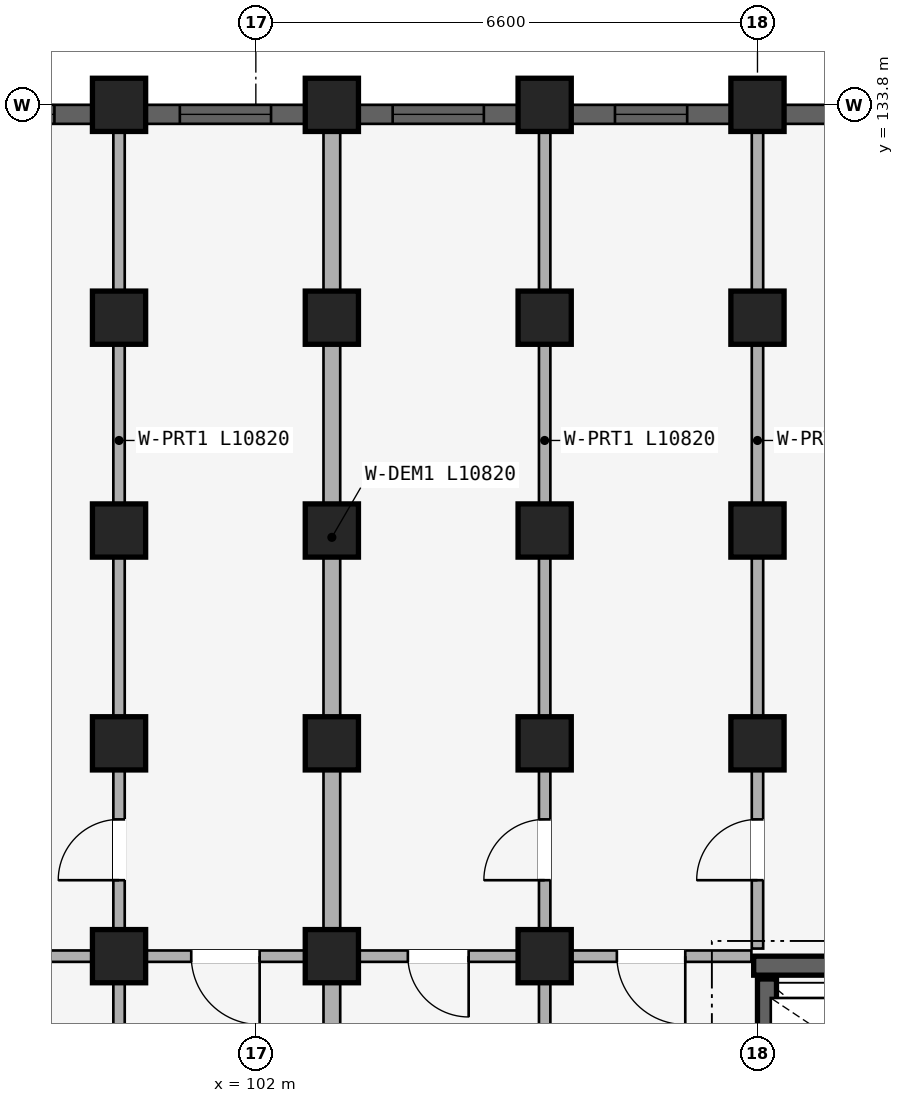
"""IFC4 building model, lengths in metres.
Left out: names, types, materials, properties, quantities, classifications, styles, units other than length and angle.
Written with IfcOpenShell. Run it as: python <this file> out.ifc"""

import sys

from ifc_helpers import new_model, si_unit, direction, frame, frame_2d, origin, origin_2d, place, context, subcontext, project, spatial, rectangle, extrude, element, fill, save


model = new_model("IFC4")
c1 = context("Model", 3, precision=1e-05, world=origin(), true_north=direction((0.0, 1.0)))
c2 = subcontext(c1, "Body", "Model", "MODEL_VIEW")
j1 = project(units=[si_unit("LENGTHUNIT", "METRE"), si_unit("PLANEANGLEUNIT", "RADIAN")], contexts=[c1])
p1 = place(None, origin())
s1 = spatial("IfcSite", under=j1, at=p1, CompositionType="ELEMENT")
p2 = place(p1, origin())
s2 = spatial("IfcBuilding", under=s1, at=p2, CompositionType="ELEMENT")
p3 = place(p2, frame((0.0, 0.0, 27.6)))
s3 = spatial("IfcBuildingStorey", under=s2, at=p3, CompositionType="ELEMENT", Elevation=27.6)
p4 = place(p3, frame((111.35, 122.475, 0.0), z_axis=(0.0, 0.0, 1.0), x_axis=(-1.0, 0.0, 0.0)))
e1 = element("IfcWall", 1, at=p4, inside=s3, PredefinedType="SHEAR", context=c2, shape_type="SweptSolid", body=[
    extrude(rectangle(XDim=2.8, YDim=0.25, at=frame_2d((1.4, 0.0))), origin(), (0.0, 0.0, 1.0), 2.93),
])
p5 = place(p3, frame((108.725, 120.15, 0.0), z_axis=(0.0, 0.0, 1.0), x_axis=(0.0, 1.0, 0.0)))
e2 = element("IfcWall", 2, at=p5, inside=s3, PredefinedType="SHEAR", context=c2, shape_type="SweptSolid", body=[
    extrude(rectangle(XDim=2.15, YDim=0.25, at=frame_2d((1.075, 0.0))), origin(), (0.0, 0.0, 1.0), 2.93),
])
for number, where, z_axis, x_axis in (
    (3, (108.6, 125.4, 0.0), (0.0, 0.0, 1.0), (1.0, 0.0, 0.0)),
    (4, (108.6, 128.2, 0.0), (0.0, 0.0, 1.0), (1.0, 0.0, 0.0)),
    (5, (108.6, 131.0, 0.0), (0.0, 0.0, 1.0), (1.0, 0.0, 0.0)),
):
    element("IfcColumn", number, at=place(p3, frame(where, z_axis=z_axis, x_axis=x_axis)), inside=s3, PredefinedType="COLUMN", context=c2, shape_type="SweptSolid", body=[
        extrude(rectangle(XDim=0.7, YDim=0.7, at=origin_2d()), origin(), (0.0, 0.0, 1.0), 2.93),
    ])
p6 = place(p3, frame((108.6, 133.8, 0.0), z_axis=(0.0, 0.0, 1.0), x_axis=(1.0, 0.0, 0.0)))
e6 = element("IfcColumn", 6, at=p6, inside=s3, PredefinedType="COLUMN", context=c2, shape_type="SweptSolid", body=[
    extrude(rectangle(XDim=0.7, YDim=0.7, at=origin_2d()), origin(), (0.0, 0.0, 1.0), 2.97),
])
for number, where, z_axis, x_axis in (
    (7, (105.8, 122.6, 0.0), (0.0, 0.0, 1.0), (1.0, 0.0, 0.0)),
    (8, (105.8, 125.4, 0.0), (0.0, 0.0, 1.0), (1.0, 0.0, 0.0)),
    (9, (105.8, 128.2, 0.0), (0.0, 0.0, 1.0), (1.0, 0.0, 0.0)),
    (10, (105.8, 131.0, 0.0), (0.0, 0.0, 1.0), (1.0, 0.0, 0.0)),
):
    element("IfcColumn", number, at=place(p3, frame(where, z_axis=z_axis, x_axis=x_axis)), inside=s3, PredefinedType="COLUMN", context=c2, shape_type="SweptSolid", body=[
        extrude(rectangle(XDim=0.7, YDim=0.7, at=origin_2d()), origin(), (0.0, 0.0, 1.0), 2.93),
    ])
p7 = place(p3, frame((105.8, 133.8, 0.0), z_axis=(0.0, 0.0, 1.0), x_axis=(1.0, 0.0, 0.0)))
e11 = element("IfcColumn", 11, at=p7, inside=s3, PredefinedType="COLUMN", context=c2, shape_type="SweptSolid", body=[
    extrude(rectangle(XDim=0.7, YDim=0.7, at=origin_2d()), origin(), (0.0, 0.0, 1.0), 2.97),
])
for number, where, z_axis, x_axis in (
    (12, (103.0, 122.6, 0.0), (0.0, 0.0, 1.0), (1.0, 0.0, 0.0)),
    (13, (103.0, 125.4, 0.0), (0.0, 0.0, 1.0), (1.0, 0.0, 0.0)),
    (14, (103.0, 128.2, 0.0), (0.0, 0.0, 1.0), (1.0, 0.0, 0.0)),
    (15, (103.0, 131.0, 0.0), (0.0, 0.0, 1.0), (1.0, 0.0, 0.0)),
):
    element("IfcColumn", number, at=place(p3, frame(where, z_axis=z_axis, x_axis=x_axis)), inside=s3, PredefinedType="COLUMN", context=c2, shape_type="SweptSolid", body=[
        extrude(rectangle(XDim=0.7, YDim=0.7, at=origin_2d()), origin(), (0.0, 0.0, 1.0), 2.93),
    ])
p8 = place(p3, frame((103.0, 133.8, 0.0), z_axis=(0.0, 0.0, 1.0), x_axis=(1.0, 0.0, 0.0)))
e16 = element("IfcColumn", 16, at=p8, inside=s3, PredefinedType="COLUMN", context=c2, shape_type="SweptSolid", body=[
    extrude(rectangle(XDim=0.7, YDim=0.7, at=origin_2d()), origin(), (0.0, 0.0, 1.0), 2.97),
])
for number, where, z_axis, x_axis in (
    (17, (100.2, 122.6, 0.0), (0.0, 0.0, 1.0), (1.0, 0.0, 0.0)),
    (18, (100.2, 125.4, 0.0), (0.0, 0.0, 1.0), (1.0, 0.0, 0.0)),
    (19, (100.2, 128.2, 0.0), (0.0, 0.0, 1.0), (1.0, 0.0, 0.0)),
    (20, (100.2, 131.0, 0.0), (0.0, 0.0, 1.0), (1.0, 0.0, 0.0)),
):
    element("IfcColumn", number, at=place(p3, frame(where, z_axis=z_axis, x_axis=x_axis)), inside=s3, PredefinedType="COLUMN", context=c2, shape_type="SweptSolid", body=[
        extrude(rectangle(XDim=0.7, YDim=0.7, at=origin_2d()), origin(), (0.0, 0.0, 1.0), 2.93),
    ])
p9 = place(p3, frame((100.2, 133.8, 0.0), z_axis=(0.0, 0.0, 1.0), x_axis=(1.0, 0.0, 0.0)))
e21 = element("IfcColumn", 21, at=p9, inside=s3, PredefinedType="COLUMN", context=c2, shape_type="SweptSolid", body=[
    extrude(rectangle(XDim=0.7, YDim=0.7, at=origin_2d()), origin(), (0.0, 0.0, 1.0), 2.97),
])
p10 = place(p3, frame((108.52, 122.6, 0.0), z_axis=(0.0, 0.0, 1.0), x_axis=(-1.0, 0.0, 0.0)))
e22 = element("IfcWall", 22, at=p10, inside=s3, PredefinedType="PLUMBINGWALL", context=c2, shape_type="SweptSolid", body=[
    extrude(rectangle(XDim=2.64, YDim=0.15, at=frame_2d((1.32, 0.0))), origin(), (0.0, 0.0, 1.0), 2.372),
])
p11 = place(p10, frame((0.87, 0.0, 0.0)))
e23 = element("IfcOpeningElement", 23, at=p11, cuts=e22, PredefinedType="OPENING", context=c2, shape_type="SweptSolid", body=[
    extrude(rectangle(XDim=0.9, YDim=2.1, at=frame_2d((0.45, 1.05))), frame((0.0, 0.085, 0.0), z_axis=(0.0, -1.0, 0.0), x_axis=(1.0, 0.0, 0.0)), (0.0, 0.0, 1.0), 0.17),
])
p12 = place(p3, frame((105.72, 122.6, 0.0), z_axis=(0.0, 0.0, 1.0), x_axis=(-1.0, 0.0, 0.0)))
e24 = element("IfcWall", 24, at=p12, inside=s3, PredefinedType="PLUMBINGWALL", context=c2, shape_type="SweptSolid", body=[
    extrude(rectangle(XDim=2.64, YDim=0.15, at=frame_2d((1.32, 0.0))), origin(), (0.0, 0.0, 1.0), 2.372),
])
p13 = place(p12, frame((0.92, 0.0, 0.0)))
e25 = element("IfcOpeningElement", 25, at=p13, cuts=e24, PredefinedType="OPENING", context=c2, shape_type="SweptSolid", body=[
    extrude(rectangle(XDim=0.8, YDim=2.1, at=frame_2d((0.4, 1.05))), frame((0.0, 0.085, 0.0), z_axis=(0.0, -1.0, 0.0), x_axis=(1.0, 0.0, 0.0)), (0.0, 0.0, 1.0), 0.17),
])
p14 = place(p3, frame((102.92, 122.6, 0.0), z_axis=(0.0, 0.0, 1.0), x_axis=(-1.0, 0.0, 0.0)))
e26 = element("IfcWall", 26, at=p14, inside=s3, PredefinedType="PLUMBINGWALL", context=c2, shape_type="SweptSolid", body=[
    extrude(rectangle(XDim=2.64, YDim=0.15, at=frame_2d((1.32, 0.0))), origin(), (0.0, 0.0, 1.0), 2.372),
])
p15 = place(p14, frame((0.87, 0.0, 0.0)))
e27 = element("IfcOpeningElement", 27, at=p15, cuts=e26, PredefinedType="OPENING", context=c2, shape_type="SweptSolid", body=[
    extrude(rectangle(XDim=0.9, YDim=2.1, at=frame_2d((0.45, 1.05))), frame((0.0, 0.085, 0.0), z_axis=(0.0, -1.0, 0.0), x_axis=(1.0, 0.0, 0.0)), (0.0, 0.0, 1.0), 0.17),
])
p16 = place(p3, frame((100.12, 122.6, 0.0), z_axis=(0.0, 0.0, 1.0), x_axis=(-1.0, 0.0, 0.0)))
e28 = element("IfcWall", 28, at=p16, inside=s3, PredefinedType="PLUMBINGWALL", context=c2, shape_type="SweptSolid", body=[
    extrude(rectangle(XDim=2.64, YDim=0.15, at=frame_2d((1.32, 0.0))), origin(), (0.0, 0.0, 1.0), 2.372),
])
p17 = place(p16, frame((0.92, 0.0, 0.0)))
e29 = element("IfcOpeningElement", 29, at=p17, cuts=e28, PredefinedType="OPENING", context=c2, shape_type="SweptSolid", body=[
    extrude(rectangle(XDim=0.8, YDim=2.1, at=frame_2d((0.4, 1.05))), frame((0.0, 0.085, 0.0), z_axis=(0.0, -1.0, 0.0), x_axis=(1.0, 0.0, 0.0)), (0.0, 0.0, 1.0), 0.17),
])
p18 = place(p3, frame((108.6, 122.7, 0.0), z_axis=(0.0, 0.0, 1.0), x_axis=(0.0, 1.0, 0.0)))
e30 = element("IfcWall", 30, at=p18, inside=s3, PredefinedType="PARTITIONING", context=c2, shape_type="SweptSolid", body=[
    extrude(rectangle(XDim=10.82, YDim=0.15, at=frame_2d((5.41, 0.0))), origin(), (0.0, 0.0, 1.0), 2.372),
])
p19 = place(p18, frame((0.899, 0.0, 0.0)))
e31 = element("IfcOpeningElement", 31, at=p19, cuts=e30, PredefinedType="OPENING", context=c2, shape_type="SweptSolid", body=[
    extrude(rectangle(XDim=0.8, YDim=2.1, at=frame_2d((0.4, 1.05))), frame((0.0, 0.085, 0.0), z_axis=(0.0, -1.0, 0.0), x_axis=(1.0, 0.0, 0.0)), (0.0, 0.0, 1.0), 0.17),
])
p20 = place(p3, frame((105.8, 116.05, 0.0), z_axis=(0.0, 0.0, 1.0), x_axis=(0.0, 1.0, 0.0)))
e32 = element("IfcWall", 32, at=p20, inside=s3, PredefinedType="PARTITIONING", context=c2, shape_type="SweptSolid", body=[
    extrude(rectangle(XDim=6.53, YDim=0.15, at=frame_2d((3.265, 0.0))), origin(), (0.0, 0.0, 1.0), 2.372),
])
p21 = place(p20, frame((2.815, 0.0, 0.0)))
e33 = element("IfcOpeningElement", 33, at=p21, cuts=e32, PredefinedType="OPENING", context=c2, shape_type="SweptSolid", body=[
    extrude(rectangle(XDim=0.9, YDim=2.1, at=frame_2d((0.45, 1.05))), frame((0.0, 0.085, 0.0), z_axis=(0.0, -1.0, 0.0), x_axis=(1.0, 0.0, 0.0)), (0.0, 0.0, 1.0), 0.17),
])
p22 = place(p3, frame((105.8, 122.7, 0.0), z_axis=(0.0, 0.0, 1.0), x_axis=(0.0, 1.0, 0.0)))
e34 = element("IfcWall", 34, at=p22, inside=s3, PredefinedType="PARTITIONING", context=c2, shape_type="SweptSolid", body=[
    extrude(rectangle(XDim=10.82, YDim=0.15, at=frame_2d((5.41, 0.0))), origin(), (0.0, 0.0, 1.0), 2.372),
])
p23 = place(p22, frame((0.899, 0.0, 0.0)))
e35 = element("IfcOpeningElement", 35, at=p23, cuts=e34, PredefinedType="OPENING", context=c2, shape_type="SweptSolid", body=[
    extrude(rectangle(XDim=0.8, YDim=2.1, at=frame_2d((0.4, 1.05))), frame((0.0, 0.085, 0.0), z_axis=(0.0, -1.0, 0.0), x_axis=(1.0, 0.0, 0.0)), (0.0, 0.0, 1.0), 0.17),
])
p24 = place(p3, frame((103.0, 116.05, 0.0), z_axis=(0.0, 0.0, 1.0), x_axis=(0.0, 1.0, 0.0)))
e36 = element("IfcWall", 36, at=p24, inside=s3, PredefinedType="STANDARD", context=c2, shape_type="SweptSolid", body=[
    extrude(rectangle(XDim=6.53, YDim=0.22, at=frame_2d((3.265, 0.0))), origin(), (0.0, 0.0, 1.0), 2.372),
])
p25 = place(p3, frame((103.0, 122.7, 0.0), z_axis=(0.0, 0.0, 1.0), x_axis=(0.0, 1.0, 0.0)))
e37 = element("IfcWall", 37, at=p25, inside=s3, PredefinedType="STANDARD", context=c2, shape_type="SweptSolid", body=[
    extrude(rectangle(XDim=10.82, YDim=0.22, at=frame_2d((5.41, 0.0))), origin(), (0.0, 0.0, 1.0), 2.372),
])
p26 = place(p3, frame((100.2, 116.05, 0.0), z_axis=(0.0, 0.0, 1.0), x_axis=(0.0, 1.0, 0.0)))
e38 = element("IfcWall", 38, at=p26, inside=s3, PredefinedType="PARTITIONING", context=c2, shape_type="SweptSolid", body=[
    extrude(rectangle(XDim=6.53, YDim=0.15, at=frame_2d((3.265, 0.0))), origin(), (0.0, 0.0, 1.0), 2.372),
])
p27 = place(p26, frame((2.815, 0.0, 0.0)))
e39 = element("IfcOpeningElement", 39, at=p27, cuts=e38, PredefinedType="OPENING", context=c2, shape_type="SweptSolid", body=[
    extrude(rectangle(XDim=0.9, YDim=2.1, at=frame_2d((0.45, 1.05))), frame((0.0, 0.085, 0.0), z_axis=(0.0, -1.0, 0.0), x_axis=(1.0, 0.0, 0.0)), (0.0, 0.0, 1.0), 0.17),
])
p28 = place(p3, frame((100.2, 122.7, 0.0), z_axis=(0.0, 0.0, 1.0), x_axis=(0.0, 1.0, 0.0)))
e40 = element("IfcWall", 40, at=p28, inside=s3, PredefinedType="PARTITIONING", context=c2, shape_type="SweptSolid", body=[
    extrude(rectangle(XDim=10.82, YDim=0.15, at=frame_2d((5.41, 0.0))), origin(), (0.0, 0.0, 1.0), 2.372),
])
p29 = place(p28, frame((0.899, 0.0, 0.0)))
e41 = element("IfcOpeningElement", 41, at=p29, cuts=e40, PredefinedType="OPENING", context=c2, shape_type="SweptSolid", body=[
    extrude(rectangle(XDim=0.8, YDim=2.1, at=frame_2d((0.4, 1.05))), frame((0.0, 0.085, 0.0), z_axis=(0.0, -1.0, 0.0), x_axis=(1.0, 0.0, 0.0)), (0.0, 0.0, 1.0), 0.17),
])
p30 = place(p3, frame((113.846, 133.675, 0.0), z_axis=(0.0, 0.0, 1.0), x_axis=(-1.0, 0.0, 0.0)))
e42 = element("IfcWall", 42, at=p30, inside=s3, PredefinedType="STANDARD", context=c2, shape_type="SweptSolid", body=[
    extrude(rectangle(XDim=4.893, YDim=0.25, at=frame_2d((2.446, 0.0))), origin(), (0.0, 0.0, 1.0), 2.48),
])
p31 = place(p30, frame((1.896, 0.0, 0.83)))
e43 = element("IfcOpeningElement", 43, at=p31, cuts=e42, PredefinedType="OPENING", context=c2, shape_type="SweptSolid", body=[
    extrude(rectangle(XDim=1.1, YDim=1.45, at=frame_2d((0.55, 0.725))), frame((0.0, 0.135, 0.0), z_axis=(0.0, -1.0, 0.0), x_axis=(1.0, 0.0, 0.0)), (0.0, 0.0, 1.0), 0.27),
])
p32 = place(p3, frame((108.247, 133.675, 0.0), z_axis=(0.0, 0.0, 1.0), x_axis=(-1.0, 0.0, 0.0)))
e44 = element("IfcWall", 44, at=p32, inside=s3, PredefinedType="STANDARD", context=c2, shape_type="SweptSolid", body=[
    extrude(rectangle(XDim=2.093, YDim=0.25, at=frame_2d((1.046, 0.0))), origin(), (0.0, 0.0, 1.0), 2.48),
])
p33 = place(p32, frame((0.572, 0.0, 0.88)))
e45 = element("IfcOpeningElement", 45, at=p33, cuts=e44, PredefinedType="OPENING", context=c2, shape_type="SweptSolid", body=[
    extrude(rectangle(XDim=0.95, YDim=1.35, at=frame_2d((0.475, 0.675))), frame((0.0, 0.135, 0.0), z_axis=(0.0, -1.0, 0.0), x_axis=(1.0, 0.0, 0.0)), (0.0, 0.0, 1.0), 0.27),
])
p34 = place(p3, frame((105.447, 133.675, 0.0), z_axis=(0.0, 0.0, 1.0), x_axis=(-1.0, 0.0, 0.0)))
e46 = element("IfcWall", 46, at=p34, inside=s3, PredefinedType="STANDARD", context=c2, shape_type="SweptSolid", body=[
    extrude(rectangle(XDim=2.093, YDim=0.25, at=frame_2d((1.046, 0.0))), origin(), (0.0, 0.0, 1.0), 2.48),
])
p35 = place(p34, frame((0.447, 0.0, 0.78)))
e47 = element("IfcOpeningElement", 47, at=p35, cuts=e46, PredefinedType="OPENING", context=c2, shape_type="SweptSolid", body=[
    extrude(rectangle(XDim=1.2, YDim=1.5, at=frame_2d((0.6, 0.75))), frame((0.0, 0.135, 0.0), z_axis=(0.0, -1.0, 0.0), x_axis=(1.0, 0.0, 0.0)), (0.0, 0.0, 1.0), 0.27),
])
p36 = place(p3, frame((102.646, 133.675, 0.0), z_axis=(0.0, 0.0, 1.0), x_axis=(-1.0, 0.0, 0.0)))
e48 = element("IfcWall", 48, at=p36, inside=s3, PredefinedType="STANDARD", context=c2, shape_type="SweptSolid", body=[
    extrude(rectangle(XDim=2.093, YDim=0.25, at=frame_2d((1.046, 0.0))), origin(), (0.0, 0.0, 1.0), 2.48),
])
p37 = place(p36, frame((0.447, 0.0, 0.78)))
e49 = element("IfcOpeningElement", 49, at=p37, cuts=e48, PredefinedType="OPENING", context=c2, shape_type="SweptSolid", body=[
    extrude(rectangle(XDim=1.2, YDim=1.5, at=frame_2d((0.6, 0.75))), frame((0.0, 0.135, 0.0), z_axis=(0.0, -1.0, 0.0), x_axis=(1.0, 0.0, 0.0)), (0.0, 0.0, 1.0), 0.27),
])
p38 = place(p3, frame((99.846, 133.675, 0.0), z_axis=(0.0, 0.0, 1.0), x_axis=(-1.0, 0.0, 0.0)))
e50 = element("IfcWall", 50, at=p38, inside=s3, PredefinedType="STANDARD", context=c2, shape_type="SweptSolid", body=[
    extrude(rectangle(XDim=2.093, YDim=0.25, at=frame_2d((1.046, 0.0))), origin(), (0.0, 0.0, 1.0), 2.48),
])
p39 = place(p38, frame((0.497, 0.0, 0.83)))
e51 = element("IfcOpeningElement", 51, at=p39, cuts=e50, PredefinedType="OPENING", context=c2, shape_type="SweptSolid", body=[
    extrude(rectangle(XDim=1.1, YDim=1.45, at=frame_2d((0.55, 0.725))), frame((0.0, 0.135, 0.0), z_axis=(0.0, -1.0, 0.0), x_axis=(1.0, 0.0, 0.0)), (0.0, 0.0, 1.0), 0.27),
])
p40 = place(p33, origin())
e52 = element("IfcWindow", 52, at=p40, inside=s3, PartitioningType="SINGLE_PANEL", PredefinedType="WINDOW", context=c2, shape_type="SweptSolid", body=[
    extrude(rectangle(XDim=0.95, YDim=1.35, at=frame_2d((0.475, 0.675))), frame((0.0, 0.03, 0.0), z_axis=(0.0, -1.0, 0.0), x_axis=(1.0, 0.0, 0.0)), (0.0, 0.0, 1.0), 0.06),
])
fill(e45, e52)
p41 = place(p35, origin())
e53 = element("IfcWindow", 53, at=p41, inside=s3, PartitioningType="SINGLE_PANEL", PredefinedType="WINDOW", context=c2, shape_type="SweptSolid", body=[
    extrude(rectangle(XDim=1.2, YDim=1.5, at=frame_2d((0.6, 0.75))), frame((0.0, 0.03, 0.0), z_axis=(0.0, -1.0, 0.0), x_axis=(1.0, 0.0, 0.0)), (0.0, 0.0, 1.0), 0.06),
])
fill(e47, e53)
p42 = place(p37, origin())
e54 = element("IfcWindow", 54, at=p42, inside=s3, PartitioningType="SINGLE_PANEL", PredefinedType="WINDOW", context=c2, shape_type="SweptSolid", body=[
    extrude(rectangle(XDim=1.2, YDim=1.5, at=frame_2d((0.6, 0.75))), frame((0.0, 0.03, 0.0), z_axis=(0.0, -1.0, 0.0), x_axis=(1.0, 0.0, 0.0)), (0.0, 0.0, 1.0), 0.06),
])
fill(e49, e54)
p43 = place(p39, origin())
e55 = element("IfcWindow", 55, at=p43, inside=s3, PartitioningType="SINGLE_PANEL", PredefinedType="WINDOW", context=c2, shape_type="SweptSolid", body=[
    extrude(rectangle(XDim=1.1, YDim=1.45, at=frame_2d((0.55, 0.725))), frame((0.0, 0.03, 0.0), z_axis=(0.0, -1.0, 0.0), x_axis=(1.0, 0.0, 0.0)), (0.0, 0.0, 1.0), 0.06),
])
fill(e51, e55)
p44 = place(p11, frame((0.9, 0.0, 0.0), z_axis=(0.0, 0.0, 1.0), x_axis=(-1.0, 0.0, 0.0)))
e56 = element("IfcDoor", 56, at=p44, inside=s3, OperationType="SINGLE_SWING_RIGHT", PredefinedType="DOOR", context=c2, shape_type="SweptSolid", body=[
    extrude(rectangle(XDim=0.9, YDim=2.1, at=frame_2d((0.45, 1.05))), frame((0.0, 0.025, 0.0), z_axis=(0.0, -1.0, 0.0), x_axis=(1.0, 0.0, 0.0)), (0.0, 0.0, 1.0), 0.05),
])
fill(e23, e56)
p45 = place(p13, frame((0.8, 0.0, 0.0), z_axis=(0.0, 0.0, 1.0), x_axis=(-1.0, 0.0, 0.0)))
e57 = element("IfcDoor", 57, at=p45, inside=s3, OperationType="SINGLE_SWING_RIGHT", PredefinedType="DOOR", context=c2, shape_type="SweptSolid", body=[
    extrude(rectangle(XDim=0.8, YDim=2.1, at=frame_2d((0.4, 1.05))), frame((0.0, 0.025, 0.0), z_axis=(0.0, -1.0, 0.0), x_axis=(1.0, 0.0, 0.0)), (0.0, 0.0, 1.0), 0.05),
])
fill(e25, e57)
p46 = place(p15, frame((0.9, 0.0, 0.0), z_axis=(0.0, 0.0, 1.0), x_axis=(-1.0, 0.0, 0.0)))
e58 = element("IfcDoor", 58, at=p46, inside=s3, OperationType="SINGLE_SWING_RIGHT", PredefinedType="DOOR", context=c2, shape_type="SweptSolid", body=[
    extrude(rectangle(XDim=0.9, YDim=2.1, at=frame_2d((0.45, 1.05))), frame((0.0, 0.025, 0.0), z_axis=(0.0, -1.0, 0.0), x_axis=(1.0, 0.0, 0.0)), (0.0, 0.0, 1.0), 0.05),
])
fill(e27, e58)
p47 = place(p19, origin())
e59 = element("IfcDoor", 59, at=p47, inside=s3, OperationType="SINGLE_SWING_LEFT", PredefinedType="DOOR", context=c2, shape_type="SweptSolid", body=[
    extrude(rectangle(XDim=0.8, YDim=2.1, at=frame_2d((0.4, 1.05))), frame((0.0, 0.025, 0.0), z_axis=(0.0, -1.0, 0.0), x_axis=(1.0, 0.0, 0.0)), (0.0, 0.0, 1.0), 0.05),
])
fill(e31, e59)
p48 = place(p23, frame((0.8, 0.0, 0.0), z_axis=(0.0, 0.0, 1.0), x_axis=(-1.0, 0.0, 0.0)))
e60 = element("IfcDoor", 60, at=p48, inside=s3, OperationType="SINGLE_SWING_RIGHT", PredefinedType="DOOR", context=c2, shape_type="SweptSolid", body=[
    extrude(rectangle(XDim=0.8, YDim=2.1, at=frame_2d((0.4, 1.05))), frame((0.0, 0.025, 0.0), z_axis=(0.0, -1.0, 0.0), x_axis=(1.0, 0.0, 0.0)), (0.0, 0.0, 1.0), 0.05),
])
fill(e35, e60)
p49 = place(p29, origin())
e61 = element("IfcDoor", 61, at=p49, inside=s3, OperationType="SINGLE_SWING_LEFT", PredefinedType="DOOR", context=c2, shape_type="SweptSolid", body=[
    extrude(rectangle(XDim=0.8, YDim=2.1, at=frame_2d((0.4, 1.05))), frame((0.0, 0.025, 0.0), z_axis=(0.0, -1.0, 0.0), x_axis=(1.0, 0.0, 0.0)), (0.0, 0.0, 1.0), 0.05),
])
fill(e41, e61)
save(model, sys.argv[1])
